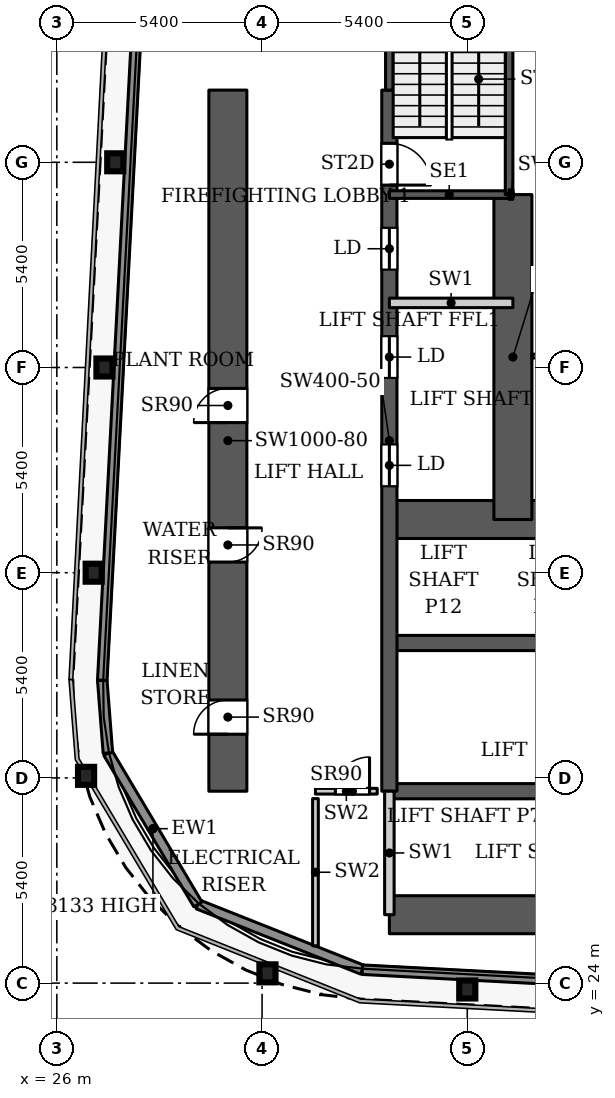
"""IFC4 building model, lengths in metres.
Left out: names, types, materials, properties, quantities, classifications, styles, units other than length and angle.
Written with IfcOpenShell. Run it as: python <this file> out.ifc"""

import sys

from ifc_helpers import new_model, si_unit, direction, frame, frame_2d, origin, origin_2d, place, context, subcontext, project, spatial, rectangle, i_section, extrude, source, transform, mapped, element, fill, save


model = new_model("IFC4")
c1 = context("Model", 3, precision=1e-05, world=origin(), true_north=direction((0.0, 1.0)))
c2 = subcontext(c1, "Body", "Model", "MODEL_VIEW")
j1 = project(units=[si_unit("LENGTHUNIT", "METRE"), si_unit("PLANEANGLEUNIT", "RADIAN")], contexts=[c1])
p1 = place(None, origin())
s1 = spatial("IfcSite", under=j1, at=p1, CompositionType="ELEMENT")
p2 = place(p1, origin())
s2 = spatial("IfcBuilding", under=s1, at=p2, CompositionType="ELEMENT")
p3 = place(p2, frame((0.0, 0.0, 61.7)))
s3 = spatial("IfcBuildingStorey", under=s2, at=p3, CompositionType="ELEMENT", Elevation=61.7)
for number, where, z_axis, x_axis in (
    (1, (36.8, 23.832, 0.0), (0.0, 0.0, 1.0), (1.0, 0.0, 0.0)),
    (2, (31.542, 24.257, 0.0), (0.0, 0.0, 1.0), (1.0, 0.0, 0.0)),
    (3, (26.769, 29.454, 0.0), (0.0, 0.0, 1.0), (1.0, 0.0, 0.0)),
    (4, (26.969, 34.8, 0.0), (0.0, 0.0, 1.0), (1.0, 0.0, 0.0)),
    (5, (27.253, 40.2, 0.0), (0.0, 0.0, 1.0), (1.0, 0.0, 0.0)),
    (6, (27.537, 45.6, 0.0), (0.0, 0.0, 1.0), (1.0, 0.0, 0.0)),
):
    element("IfcColumn", number, at=place(p3, frame(where, z_axis=z_axis, x_axis=x_axis)), inside=s3, PredefinedType="COLUMN", context=c2, shape_type="SweptSolid", body=[
        extrude(i_section(OverallWidth=0.424, OverallDepth=0.474, WebThickness=0.048, FlangeThickness=0.077, FilletRadius=0.014, at=origin_2d()), origin(), (0.0, 0.0, 1.0), 3.9),
    ])
p4 = place(p3, frame((34.75, 25.8, 0.0), z_axis=(0.0, 0.0, 1.0), x_axis=(1.0, 0.0, 0.0)))
e7 = element("IfcWall", 7, at=p4, inside=s3, PredefinedType="SHEAR", context=c2, shape_type="SweptSolid", body=[
    extrude(rectangle(XDim=18.4, YDim=1.0, at=frame_2d((9.2, 0.0))), origin(), (0.0, 0.0, 1.0), 3.9),
])
p5 = place(p3, frame((34.75, 29.05, 0.0), z_axis=(0.0, 0.0, 1.0), x_axis=(1.0, 0.0, 0.0)))
e8 = element("IfcWall", 8, at=p5, inside=s3, PredefinedType="SHEAR", context=c2, shape_type="SweptSolid", body=[
    extrude(rectangle(XDim=18.4, YDim=0.4, at=frame_2d((9.2, 0.0))), origin(), (0.0, 0.0, 1.0), 3.9),
])
p6 = place(p5, frame((15.125, 0.0, 0.0)))
e9 = element("IfcOpeningElement", 9, at=p6, cuts=e8, PredefinedType="OPENING", context=c2, shape_type="SweptSolid", body=[
    extrude(rectangle(XDim=1.1, YDim=2.2, at=frame_2d((0.55, 1.1))), frame((0.0, 0.21, 0.0), z_axis=(0.0, -1.0, 0.0), x_axis=(1.0, 0.0, 0.0)), (0.0, 0.0, 1.0), 0.42),
])
p7 = place(p3, frame((34.75, 32.95, 0.0), z_axis=(0.0, 0.0, 1.0), x_axis=(1.0, 0.0, 0.0)))
e10 = element("IfcWall", 10, at=p7, inside=s3, PredefinedType="SHEAR", context=c2, shape_type="SweptSolid", body=[
    extrude(rectangle(XDim=14.25, YDim=0.4, at=frame_2d((7.125, 0.0))), origin(), (0.0, 0.0, 1.0), 3.9),
])
p8 = place(p3, frame((34.75, 36.2, 0.0), z_axis=(0.0, 0.0, 1.0), x_axis=(1.0, 0.0, 0.0)))
e11 = element("IfcWall", 11, at=p8, inside=s3, PredefinedType="SHEAR", context=c2, shape_type="SweptSolid", body=[
    extrude(rectangle(XDim=18.4, YDim=1.0, at=frame_2d((9.2, 0.0))), origin(), (0.0, 0.0, 1.0), 3.9),
])
p9 = place(p8, frame((16.9, 0.0, 0.0)))
e12 = element("IfcOpeningElement", 12, at=p9, cuts=e11, PredefinedType="OPENING", context=c2, shape_type="SweptSolid", body=[
    extrude(rectangle(XDim=1.0, YDim=2.2, at=frame_2d((0.5, 1.1))), frame((0.0, 0.51, 0.0), z_axis=(0.0, -1.0, 0.0), x_axis=(1.0, 0.0, 0.0)), (0.0, 0.0, 1.0), 1.02),
])
p10 = place(p3, frame((34.75, 29.05, 0.0), z_axis=(0.0, 0.0, 1.0), x_axis=(0.0, 1.0, 0.0)))
e13 = element("IfcWall", 13, at=p10, inside=s3, PredefinedType="SHEAR", context=c2, shape_type="SweptSolid", body=[
    extrude(rectangle(XDim=18.45, YDim=0.4, at=frame_2d((9.225, 0.0))), origin(), (0.0, 0.0, 1.0), 3.9),
])
p11 = place(p10, frame((8.025, 0.0, 0.0)))
e14 = element("IfcOpeningElement", 14, at=p11, cuts=e13, PredefinedType="OPENING", context=c2, shape_type="SweptSolid", body=[
    extrude(rectangle(XDim=1.1, YDim=2.2, at=frame_2d((0.55, 1.1))), frame((0.0, 0.21, 0.0), z_axis=(0.0, -1.0, 0.0), x_axis=(1.0, 0.0, 0.0)), (0.0, 0.0, 1.0), 0.42),
])
p12 = place(p10, frame((10.875, 0.0, 0.0)))
e15 = element("IfcOpeningElement", 15, at=p12, cuts=e13, PredefinedType="OPENING", context=c2, shape_type="SweptSolid", body=[
    extrude(rectangle(XDim=1.1, YDim=2.2, at=frame_2d((0.55, 1.1))), frame((0.0, 0.21, 0.0), z_axis=(0.0, -1.0, 0.0), x_axis=(1.0, 0.0, 0.0)), (0.0, 0.0, 1.0), 0.42),
])
p13 = place(p10, frame((13.725, 0.0, 0.0)))
e16 = element("IfcOpeningElement", 16, at=p13, cuts=e13, PredefinedType="OPENING", context=c2, shape_type="SweptSolid", body=[
    extrude(rectangle(XDim=1.1, YDim=2.2, at=frame_2d((0.55, 1.1))), frame((0.0, 0.21, 0.0), z_axis=(0.0, -1.0, 0.0), x_axis=(1.0, 0.0, 0.0)), (0.0, 0.0, 1.0), 0.42),
])
p14 = place(p10, frame((15.95, 0.0, 0.0)))
e17 = element("IfcOpeningElement", 17, at=p14, cuts=e13, PredefinedType="OPENING", context=c2, shape_type="SweptSolid", body=[
    extrude(rectangle(XDim=1.1, YDim=2.2, at=frame_2d((0.55, 1.1))), frame((0.0, 0.21, 0.0), z_axis=(0.0, -1.0, 0.0), x_axis=(1.0, 0.0, 0.0)), (0.0, 0.0, 1.0), 0.42),
])
p15 = place(p3, frame((38.0, 36.2, 0.0), z_axis=(0.0, 0.0, 1.0), x_axis=(0.0, 1.0, 0.0)))
e18 = element("IfcWall", 18, at=p15, inside=s3, PredefinedType="SHEAR", context=c2, shape_type="SweptSolid", body=[
    extrude(rectangle(XDim=8.55, YDim=1.0, at=frame_2d((4.275, 0.0))), origin(), (0.0, 0.0, 1.0), 3.9),
])
p16 = place(p3, frame((30.5, 29.05, 0.0), z_axis=(0.0, 0.0, 1.0), x_axis=(0.0, 1.0, 0.0)))
e19 = element("IfcWall", 19, at=p16, inside=s3, PredefinedType="SHEAR", context=c2, shape_type="SweptSolid", body=[
    extrude(rectangle(XDim=18.45, YDim=1.0, at=frame_2d((9.225, 0.0))), origin(), (0.0, 0.0, 1.0), 3.9),
])
p17 = place(p16, frame((1.5, 0.0, 0.0)))
e20 = element("IfcOpeningElement", 20, at=p17, cuts=e19, PredefinedType="OPENING", context=c2, shape_type="SweptSolid", body=[
    extrude(rectangle(XDim=0.9, YDim=2.2, at=frame_2d((0.45, 1.1))), frame((0.0, 0.51, 0.0), z_axis=(0.0, -1.0, 0.0), x_axis=(1.0, 0.0, 0.0)), (0.0, 0.0, 1.0), 1.02),
])
p18 = place(p16, frame((6.03, 0.0, 0.0)))
e21 = element("IfcOpeningElement", 21, at=p18, cuts=e19, PredefinedType="OPENING", context=c2, shape_type="SweptSolid", body=[
    extrude(rectangle(XDim=0.9, YDim=2.2, at=frame_2d((0.45, 1.1))), frame((0.0, 0.51, 0.0), z_axis=(0.0, -1.0, 0.0), x_axis=(1.0, 0.0, 0.0)), (0.0, 0.0, 1.0), 1.02),
])
p19 = place(p16, frame((9.7, 0.0, 0.0)))
e22 = element("IfcOpeningElement", 22, at=p19, cuts=e19, PredefinedType="OPENING", context=c2, shape_type="SweptSolid", body=[
    extrude(rectangle(XDim=0.9, YDim=2.2, at=frame_2d((0.45, 1.1))), frame((0.0, 0.51, 0.0), z_axis=(0.0, -1.0, 0.0), x_axis=(1.0, 0.0, 0.0)), (0.0, 0.0, 1.0), 1.02),
])
p20 = place(p3, frame((34.039, 24.353, 0.0), z_axis=(0.0, 0.0, 1.0), x_axis=(-0.929352825399, 0.369192803184, 0.0)))
e23 = element("IfcWall", 23, at=p20, inside=s3, PredefinedType="SOLIDWALL", context=c2, shape_type="SweptSolid", body=[
    extrude(rectangle(XDim=4.656, YDim=0.25, at=frame_2d((2.328, 0.0))), origin(), (0.0, 0.0, 1.0), 3.75),
])
p21 = place(p3, frame((29.712, 26.072, 0.0), z_axis=(0.0, 0.0, 1.0), x_axis=(-0.511028049012, 0.859564036662, 0.0)))
e24 = element("IfcWall", 24, at=p21, inside=s3, PredefinedType="SOLIDWALL", context=c2, shape_type="SweptSolid", body=[
    extrude(rectangle(XDim=4.634, YDim=0.25, at=frame_2d((2.317, 0.0))), origin(), (0.0, 0.0, 1.0), 3.133),
])
p22 = place(p3, frame((27.344, 30.055, 0.0), z_axis=(0.0, 0.0, 1.0), x_axis=(-0.077571675317, 0.99698677784, 0.0)))
e25 = element("IfcWall", 25, at=p22, inside=s3, PredefinedType="SOLIDWALL", context=c2, shape_type="SweptSolid", body=[
    extrude(rectangle(XDim=1.92, YDim=0.25, at=frame_2d((0.96, 0.0))), origin(), (0.0, 0.0, 1.0), 3.75),
])
p23 = place(p3, frame((27.195, 31.969, 0.0), z_axis=(0.0, 0.0, 1.0), x_axis=(0.052554995867, 0.998618031286, 0.0)))
e26 = element("IfcWall", 26, at=p23, inside=s3, PredefinedType="SOLIDWALL", context=c2, shape_type="SweptSolid", body=[
    extrude(rectangle(XDim=66.787, YDim=0.25, at=frame_2d((33.394, 0.0))), origin(), (0.0, 0.0, 1.0), 3.75),
])
p24 = place(p3, frame((100.586, 20.85, 0.0), z_axis=(0.0, 0.0, 1.0), x_axis=(-0.99861746497, 0.052565755559, 0.0)))
e27 = element("IfcWall", 27, at=p24, inside=s3, PredefinedType="SOLIDWALL", context=c2, shape_type="SweptSolid", body=[
    extrude(rectangle(XDim=66.639, YDim=0.25, at=frame_2d((33.319, 0.0))), origin(), (0.0, 0.0, 1.0), 3.75),
])
p25 = place(p3, frame((34.75, 44.75, 0.0), z_axis=(0.0, 0.0, 1.0), x_axis=(1.0, 0.0, 0.0)))
e28 = element("IfcWall", 28, at=p25, inside=s3, PredefinedType="SHEAR", context=c2, shape_type="SweptSolid", body=[
    extrude(rectangle(XDim=3.15, YDim=0.2, at=frame_2d((1.575, 0.0))), origin(), (0.0, 0.0, 1.0), 3.9),
])
p26 = place(p3, frame((34.75, 47.5, 0.0), z_axis=(0.0, 0.0, 1.0), x_axis=(0.0, 1.0, 0.0)))
e29 = element("IfcWall", 29, at=p26, inside=s3, PredefinedType="SHEAR", context=c2, shape_type="SweptSolid", body=[
    extrude(rectangle(XDim=6.41, YDim=0.2, at=frame_2d((3.205, 0.0))), origin(), (0.0, 0.0, 1.0), 3.9),
])
p27 = place(p3, frame((37.9, 44.75, 0.0), z_axis=(0.0, 0.0, 1.0), x_axis=(0.0, 1.0, 0.0)))
e30 = element("IfcWall", 30, at=p27, inside=s3, PredefinedType="SHEAR", context=c2, shape_type="SweptSolid", body=[
    extrude(rectangle(XDim=9.16, YDim=0.2, at=frame_2d((4.58, 0.0))), origin(), (0.0, 0.0, 1.0), 3.9),
])
for number, where, z_axis, x_axis in (
    (31, (34.75, 25.8, 0.0), (0.0, 0.0, 1.0), (0.0, 1.0, 0.0)),
    (32, (34.75, 41.9, 0.0), (0.0, 0.0, 1.0), (1.0, 0.0, 0.0)),
):
    element("IfcWall", number, at=place(p3, frame(where, z_axis=z_axis, x_axis=x_axis)), inside=s3, PredefinedType="PARTITIONING", context=c2, shape_type="SweptSolid", body=[
        extrude(rectangle(XDim=3.25, YDim=0.25, at=frame_2d((1.625, 0.0))), origin(), (0.0, 0.0, 1.0), 3.9),
    ])
p28 = place(p3, frame((37.9, 44.75, 0.0), z_axis=(0.0, 0.0, 1.0), x_axis=(1.0, 0.0, 0.0)))
e33 = element("IfcWall", 33, at=p28, inside=s3, PredefinedType="PARTITIONING", context=c2, shape_type="SweptSolid", body=[
    extrude(rectangle(XDim=0.1, YDim=0.25, at=frame_2d((0.05, 0.0))), origin(), (0.0, 0.0, 1.0), 3.9),
])
p29 = place(p3, frame((32.805, 29.05, 0.0), z_axis=(0.0, 0.0, 1.0), x_axis=(1.0, 0.0, 0.0)))
e34 = element("IfcWall", 34, at=p29, inside=s3, PredefinedType="PARTITIONING", context=c2, shape_type="SweptSolid", body=[
    extrude(rectangle(XDim=1.625, YDim=0.15, at=frame_2d((0.812, 0.0))), origin(), (0.0, 0.0, 1.0), 3.9),
])
p30 = place(p29, frame((0.523, 0.0, 0.0)))
e35 = element("IfcOpeningElement", 35, at=p30, cuts=e34, PredefinedType="OPENING", context=c2, shape_type="SweptSolid", body=[
    extrude(rectangle(XDim=0.9, YDim=2.2, at=frame_2d((0.45, 1.1))), frame((0.0, 0.085, 0.0), z_axis=(0.0, -1.0, 0.0), x_axis=(1.0, 0.0, 0.0)), (0.0, 0.0, 1.0), 0.17),
])
p31 = place(p3, frame((32.805, 24.98, 0.0), z_axis=(0.0, 0.0, 1.0), x_axis=(0.0, 1.0, 0.0)))
e36 = element("IfcWall", 36, at=p31, inside=s3, PredefinedType="PARTITIONING", context=c2, shape_type="SweptSolid", body=[
    extrude(rectangle(XDim=3.875, YDim=0.15, at=frame_2d((1.938, 0.0))), origin(), (0.0, 0.0, 1.0), 3.9),
])
p32 = place(p3, frame((38.499, 40.5, 0.0), z_axis=(0.0, 0.0, 1.0), x_axis=(1.0, 0.0, 0.0)))
e37 = element("IfcWall", 37, at=p32, inside=s3, PredefinedType="PARTITIONING", context=c2, shape_type="SweptSolid", body=[
    extrude(rectangle(XDim=14.801, YDim=0.1, at=frame_2d((7.4, 0.0))), origin(), (0.0, 0.0, 1.0), 3.6),
])
p33 = place(p32, frame((6.701, 0.0, 0.0)))
e38 = element("IfcOpeningElement", 38, at=p33, cuts=e37, PredefinedType="OPENING", context=c2, shape_type="SweptSolid", body=[
    extrude(rectangle(XDim=1.0, YDim=2.1, at=frame_2d((0.5, 1.05))), frame((0.0, 0.06, 0.0), z_axis=(0.0, -1.0, 0.0), x_axis=(1.0, 0.0, 0.0)), (0.0, 0.0, 1.0), 0.12),
])
m1 = source(origin(), c2, "Body", "SweptSolid", [
    extrude(rectangle(XDim=1.1, YDim=2.2, at=frame_2d((0.55, 1.1))), frame((0.0, 0.025, 0.0), z_axis=(0.0, -1.0, 0.0), x_axis=(1.0, 0.0, 0.0)), (0.0, 0.0, 1.0), 0.05),
])
p34 = place(p11, origin())
e39 = element("IfcDoor", 39, at=p34, inside=s3, OperationType="SLIDING_TO_LEFT", PredefinedType="DOOR", context=c2, shape_type="MappedRepresentation", body=[
    mapped(m1, transform((0.0, 0.0, 0.0), x_axis=(1.0, 0.0, 0.0), y_axis=(0.0, 1.0, 0.0), z_axis=(0.0, 0.0, 1.0), scale=1.0)),
])
fill(e14, e39)
p35 = place(p12, origin())
e40 = element("IfcDoor", 40, at=p35, inside=s3, OperationType="SLIDING_TO_LEFT", PredefinedType="DOOR", context=c2, shape_type="MappedRepresentation", body=[
    mapped(m1, transform((0.0, 0.0, 0.0), x_axis=(1.0, 0.0, 0.0), y_axis=(0.0, 1.0, 0.0), z_axis=(0.0, 0.0, 1.0), scale=1.0)),
])
fill(e15, e40)
p36 = place(p13, origin())
e41 = element("IfcDoor", 41, at=p36, inside=s3, OperationType="SLIDING_TO_LEFT", PredefinedType="DOOR", context=c2, shape_type="MappedRepresentation", body=[
    mapped(m1, transform((0.0, 0.0, 0.0), x_axis=(1.0, 0.0, 0.0), y_axis=(0.0, 1.0, 0.0), z_axis=(0.0, 0.0, 1.0), scale=1.0)),
])
fill(e16, e41)
m2 = source(origin(), c2, "Body", "SweptSolid", [
    extrude(rectangle(XDim=0.9, YDim=2.2, at=frame_2d((0.45, 1.1))), frame((0.0, 0.025, 0.0), z_axis=(0.0, -1.0, 0.0), x_axis=(1.0, 0.0, 0.0)), (0.0, 0.0, 1.0), 0.05),
])
p37 = place(p17, origin())
e42 = element("IfcDoor", 42, at=p37, inside=s3, OperationType="SINGLE_SWING_LEFT", PredefinedType="DOOR", context=c2, shape_type="MappedRepresentation", body=[
    mapped(m2, transform((0.0, 0.0, 0.0), x_axis=(1.0, 0.0, 0.0), y_axis=(0.0, 1.0, 0.0), z_axis=(0.0, 0.0, 1.0), scale=1.0)),
])
fill(e20, e42)
p38 = place(p18, origin())
e43 = element("IfcDoor", 43, at=p38, inside=s3, OperationType="SINGLE_SWING_RIGHT", PredefinedType="DOOR", context=c2, shape_type="MappedRepresentation", body=[
    mapped(m2, transform((0.0, 0.0, 0.0), x_axis=(1.0, 0.0, 0.0), y_axis=(0.0, 1.0, 0.0), z_axis=(0.0, 0.0, 1.0), scale=1.0)),
])
fill(e21, e43)
p39 = place(p19, origin())
e44 = element("IfcDoor", 44, at=p39, inside=s3, OperationType="SINGLE_SWING_LEFT", PredefinedType="DOOR", context=c2, shape_type="MappedRepresentation", body=[
    mapped(m2, transform((0.0, 0.0, 0.0), x_axis=(1.0, 0.0, 0.0), y_axis=(0.0, 1.0, 0.0), z_axis=(0.0, 0.0, 1.0), scale=1.0)),
])
fill(e22, e44)
p40 = place(p30, origin())
e45 = element("IfcDoor", 45, at=p40, inside=s3, OperationType="SINGLE_SWING_LEFT", PredefinedType="DOOR", context=c2, shape_type="MappedRepresentation", body=[
    mapped(m2, transform((0.0, 0.0, 0.0), x_axis=(1.0, 0.0, 0.0), y_axis=(0.0, 1.0, 0.0), z_axis=(0.0, 0.0, 1.0), scale=1.0)),
])
fill(e35, e45)
m3 = source(origin(), c2, "Body", "SweptSolid", [
    extrude(rectangle(XDim=1.1, YDim=2.2, at=frame_2d((0.55, 1.1))), frame((0.0, 0.025, 0.0), z_axis=(0.0, -1.0, 0.0), x_axis=(1.0, 0.0, 0.0)), (0.0, 0.0, 1.0), 0.05),
])
p41 = place(p14, origin())
e46 = element("IfcDoor", 46, at=p41, inside=s3, OperationType="SINGLE_SWING_RIGHT", PredefinedType="DOOR", context=c2, shape_type="MappedRepresentation", body=[
    mapped(m3, transform((0.0, 0.0, 0.0), x_axis=(1.0, 0.0, 0.0), y_axis=(0.0, 1.0, 0.0), z_axis=(0.0, 0.0, 1.0), scale=1.0)),
])
fill(e17, e46)
save(model, sys.argv[1])
